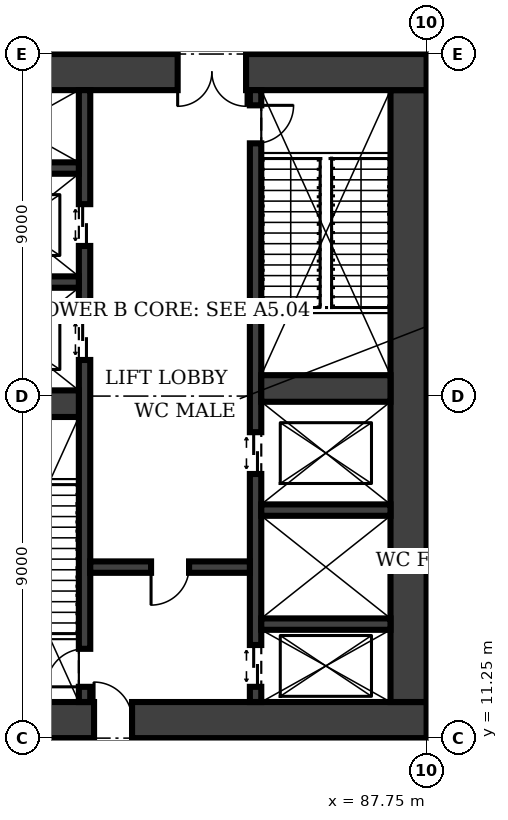
"""IFC4 building model, lengths in metres.
Left out: names, types, materials, properties, quantities, classifications, styles, units other than length and angle.
Written with IfcOpenShell. Run it as: python <this file> out.ifc"""

import sys

from ifc_helpers import new_model, si_unit, direction, frame, frame_2d, origin, place, context, subcontext, project, spatial, rectangle, extrude, element, fill, save


model = new_model("IFC4")
c1 = context("Model", 3, precision=1e-05, world=origin(), true_north=direction((0.0, 1.0)))
c2 = subcontext(c1, "Body", "Model", "MODEL_VIEW")
j1 = project(units=[si_unit("LENGTHUNIT", "METRE"), si_unit("PLANEANGLEUNIT", "RADIAN")], contexts=[c1])
p1 = place(None, origin())
s1 = spatial("IfcSite", under=j1, at=p1, CompositionType="ELEMENT")
p2 = place(p1, origin())
s2 = spatial("IfcBuilding", under=s1, at=p2, CompositionType="ELEMENT")
p3 = place(p2, frame((0.0, 0.0, 6.0)))
s3 = spatial("IfcBuildingStorey", under=s2, at=p3, CompositionType="ELEMENT", Elevation=6.0)
p4 = place(p3, frame((74.25, 11.725, 0.0), z_axis=(0.0, 0.0, 1.0), x_axis=(1.0, 0.0, 0.0)))
e1 = element("IfcWall", 1, at=p4, inside=s3, PredefinedType="SHEAR", context=c2, shape_type="SweptSolid", body=[
    extrude(rectangle(XDim=13.5, YDim=0.95, at=frame_2d((6.75, 0.0))), origin(), (0.0, 0.0, 1.0), 5.0),
])
p5 = place(p4, frame((4.75, 0.0, 0.0)))
e2 = element("IfcOpeningElement", 2, at=p5, cuts=e1, PredefinedType="OPENING", context=c2, shape_type="SweptSolid", body=[
    extrude(rectangle(XDim=1.0, YDim=2.1, at=frame_2d((0.5, 1.05))), frame((0.0, 0.485, 0.0), z_axis=(0.0, -1.0, 0.0), x_axis=(1.0, 0.0, 0.0)), (0.0, 0.0, 1.0), 0.97),
])
p6 = place(p3, frame((87.275, 12.2, 0.0), z_axis=(0.0, 0.0, 1.0), x_axis=(0.0, 1.0, 0.0)))
e3 = element("IfcWall", 3, at=p6, inside=s3, PredefinedType="SHEAR", context=c2, shape_type="SweptSolid", body=[
    extrude(rectangle(XDim=16.1, YDim=0.95, at=frame_2d((8.05, 0.0))), origin(), (0.0, 0.0, 1.0), 5.0),
])
p7 = place(p3, frame((87.75, 28.775, 0.0), z_axis=(0.0, 0.0, 1.0), x_axis=(-1.0, 0.0, 0.0)))
e4 = element("IfcWall", 4, at=p7, inside=s3, PredefinedType="SHEAR", context=c2, shape_type="SweptSolid", body=[
    extrude(rectangle(XDim=13.5, YDim=0.95, at=frame_2d((6.75, 0.0))), origin(), (0.0, 0.0, 1.0), 5.0),
])
p8 = place(p7, frame((4.75, 0.0, 0.0)))
e5 = element("IfcOpeningElement", 5, at=p8, cuts=e4, PredefinedType="OPENING", context=c2, shape_type="SweptSolid", body=[
    extrude(rectangle(XDim=1.8, YDim=2.1, at=frame_2d((0.9, 1.05))), frame((0.0, 0.485, 0.0), z_axis=(0.0, -1.0, 0.0), x_axis=(1.0, 0.0, 0.0)), (0.0, 0.0, 1.0), 0.97),
])
p9 = place(p3, frame((78.75, 12.2, 0.0), z_axis=(0.0, 0.0, 1.0), x_axis=(0.0, 1.0, 0.0)))
e6 = element("IfcWall", 6, at=p9, inside=s3, PredefinedType="SHEAR", context=c2, shape_type="SweptSolid", body=[
    extrude(rectangle(XDim=16.1, YDim=0.3, at=frame_2d((8.05, 0.0))), origin(), (0.0, 0.0, 1.0), 5.0),
])
p10 = place(p9, frame((0.4, 0.0, 0.0)))
e7 = element("IfcOpeningElement", 7, at=p10, cuts=e6, PredefinedType="OPENING", context=c2, shape_type="SweptSolid", body=[
    extrude(rectangle(XDim=1.0, YDim=2.1, at=frame_2d((0.5, 1.05))), frame((0.0, 0.16, 0.0), z_axis=(0.0, -1.0, 0.0), x_axis=(1.0, 0.0, 0.0)), (0.0, 0.0, 1.0), 0.32),
])
p11 = place(p9, frame((9.0, 0.0, 0.0)))
e8 = element("IfcOpeningElement", 8, at=p11, cuts=e6, PredefinedType="OPENING", context=c2, shape_type="SweptSolid", body=[
    extrude(rectangle(XDim=1.1, YDim=2.1, at=frame_2d((0.55, 1.05))), frame((0.0, 0.16, 0.0), z_axis=(0.0, -1.0, 0.0), x_axis=(1.0, 0.0, 0.0)), (0.0, 0.0, 1.0), 0.32),
])
p12 = place(p9, frame((12.0, 0.0, 0.0)))
e9 = element("IfcOpeningElement", 9, at=p12, cuts=e6, PredefinedType="OPENING", context=c2, shape_type="SweptSolid", body=[
    extrude(rectangle(XDim=1.1, YDim=2.1, at=frame_2d((0.55, 1.05))), frame((0.0, 0.16, 0.0), z_axis=(0.0, -1.0, 0.0), x_axis=(1.0, 0.0, 0.0)), (0.0, 0.0, 1.0), 0.32),
])
p13 = place(p3, frame((83.25, 12.2, 0.0), z_axis=(0.0, 0.0, 1.0), x_axis=(0.0, 1.0, 0.0)))
e10 = element("IfcWall", 10, at=p13, inside=s3, PredefinedType="SHEAR", context=c2, shape_type="SweptSolid", body=[
    extrude(rectangle(XDim=16.1, YDim=0.3, at=frame_2d((8.05, 0.0))), origin(), (0.0, 0.0, 1.0), 5.0),
])
p14 = place(p13, frame((14.7, 0.0, 0.0)))
e11 = element("IfcOpeningElement", 11, at=p14, cuts=e10, PredefinedType="OPENING", context=c2, shape_type="SweptSolid", body=[
    extrude(rectangle(XDim=1.0, YDim=2.1, at=frame_2d((0.5, 1.05))), frame((0.0, 0.16, 0.0), z_axis=(0.0, -1.0, 0.0), x_axis=(1.0, 0.0, 0.0)), (0.0, 0.0, 1.0), 0.32),
])
p15 = place(p13, frame((0.4, 0.0, 0.0)))
e12 = element("IfcOpeningElement", 12, at=p15, cuts=e10, PredefinedType="OPENING", context=c2, shape_type="SweptSolid", body=[
    extrude(rectangle(XDim=1.1, YDim=2.1, at=frame_2d((0.55, 1.05))), frame((0.0, 0.16, 0.0), z_axis=(0.0, -1.0, 0.0), x_axis=(1.0, 0.0, 0.0)), (0.0, 0.0, 1.0), 0.32),
])
p16 = place(p13, frame((6.0, 0.0, 0.0)))
e13 = element("IfcOpeningElement", 13, at=p16, cuts=e10, PredefinedType="OPENING", context=c2, shape_type="SweptSolid", body=[
    extrude(rectangle(XDim=1.1, YDim=2.1, at=frame_2d((0.55, 1.05))), frame((0.0, 0.16, 0.0), z_axis=(0.0, -1.0, 0.0), x_axis=(1.0, 0.0, 0.0)), (0.0, 0.0, 1.0), 0.32),
])
p17 = place(p3, frame((75.2, 20.05, 0.0), z_axis=(0.0, 0.0, 1.0), x_axis=(1.0, 0.0, 0.0)))
e14 = element("IfcWall", 14, at=p17, inside=s3, PredefinedType="SHEAR", context=c2, shape_type="SweptSolid", body=[
    extrude(rectangle(XDim=3.4, YDim=0.7, at=frame_2d((1.7, 0.0))), origin(), (0.0, 0.0, 1.0), 5.0),
])
p18 = place(p3, frame((78.9, 15.75, 0.0), z_axis=(0.0, 0.0, 1.0), x_axis=(1.0, 0.0, 0.0)))
e15 = element("IfcWall", 15, at=p18, inside=s3, PredefinedType="SHEAR", context=c2, shape_type="SweptSolid", body=[
    extrude(rectangle(XDim=4.2, YDim=0.3, at=frame_2d((2.1, 0.0))), origin(), (0.0, 0.0, 1.0), 5.0),
])
p19 = place(p18, frame((1.6, 0.0, 0.0)))
e16 = element("IfcOpeningElement", 16, at=p19, cuts=e15, PredefinedType="OPENING", context=c2, shape_type="SweptSolid", body=[
    extrude(rectangle(XDim=1.0, YDim=2.1, at=frame_2d((0.5, 1.05))), frame((0.0, 0.16, 0.0), z_axis=(0.0, -1.0, 0.0), x_axis=(1.0, 0.0, 0.0)), (0.0, 0.0, 1.0), 0.32),
])
for number, where, z_axis, x_axis in (
    (17, (83.4, 14.25, 0.0), (0.0, 0.0, 1.0), (1.0, 0.0, 0.0)),
    (18, (83.4, 17.25, 0.0), (0.0, 0.0, 1.0), (1.0, 0.0, 0.0)),
):
    element("IfcWall", number, at=place(p3, frame(where, z_axis=z_axis, x_axis=x_axis)), inside=s3, PredefinedType="SHEAR", context=c2, shape_type="SweptSolid", body=[
        extrude(rectangle(XDim=3.4, YDim=0.3, at=frame_2d((1.7, 0.0))), origin(), (0.0, 0.0, 1.0), 5.0),
    ])
p20 = place(p3, frame((83.4, 20.45, 0.0), z_axis=(0.0, 0.0, 1.0), x_axis=(1.0, 0.0, 0.0)))
e19 = element("IfcWall", 19, at=p20, inside=s3, PredefinedType="SHEAR", context=c2, shape_type="SweptSolid", body=[
    extrude(rectangle(XDim=3.4, YDim=0.7, at=frame_2d((1.7, 0.0))), origin(), (0.0, 0.0, 1.0), 5.0),
])
for number, where, z_axis, x_axis in (
    (20, (75.2, 23.25, 0.0), (0.0, 0.0, 1.0), (1.0, 0.0, 0.0)),
    (21, (75.2, 26.25, 0.0), (0.0, 0.0, 1.0), (1.0, 0.0, 0.0)),
):
    element("IfcWall", number, at=place(p3, frame(where, z_axis=z_axis, x_axis=x_axis)), inside=s3, PredefinedType="SHEAR", context=c2, shape_type="SweptSolid", body=[
        extrude(rectangle(XDim=3.4, YDim=0.3, at=frame_2d((1.7, 0.0))), origin(), (0.0, 0.0, 1.0), 5.0),
    ])
p21 = place(p5, origin())
e22 = element("IfcDoor", 22, at=p21, inside=s3, OperationType="SINGLE_SWING_LEFT", PredefinedType="DOOR", context=c2, shape_type="SweptSolid", body=[
    extrude(rectangle(XDim=1.0, YDim=2.1, at=frame_2d((0.5, 1.05))), frame((0.0, 0.025, 0.0), z_axis=(0.0, -1.0, 0.0), x_axis=(1.0, 0.0, 0.0)), (0.0, 0.0, 1.0), 0.05),
])
fill(e2, e22)
p22 = place(p8, origin())
e23 = element("IfcDoor", 23, at=p22, inside=s3, OperationType="DOUBLE_DOOR_SINGLE_SWING", PredefinedType="DOOR", context=c2, shape_type="SweptSolid", body=[
    extrude(rectangle(XDim=1.8, YDim=2.1, at=frame_2d((0.9, 1.05))), frame((0.0, 0.025, 0.0), z_axis=(0.0, -1.0, 0.0), x_axis=(1.0, 0.0, 0.0)), (0.0, 0.0, 1.0), 0.05),
])
fill(e5, e23)
p23 = place(p19, frame((1.0, 0.0, 0.0), z_axis=(0.0, 0.0, 1.0), x_axis=(-1.0, 0.0, 0.0)))
e24 = element("IfcDoor", 24, at=p23, inside=s3, OperationType="SINGLE_SWING_RIGHT", PredefinedType="DOOR", context=c2, shape_type="SweptSolid", body=[
    extrude(rectangle(XDim=1.0, YDim=2.1, at=frame_2d((0.5, 1.05))), frame((0.0, 0.025, 0.0), z_axis=(0.0, -1.0, 0.0), x_axis=(1.0, 0.0, 0.0)), (0.0, 0.0, 1.0), 0.05),
])
fill(e16, e24)
p24 = place(p10, origin())
e25 = element("IfcDoor", 25, at=p24, inside=s3, OperationType="SINGLE_SWING_LEFT", PredefinedType="DOOR", context=c2, shape_type="SweptSolid", body=[
    extrude(rectangle(XDim=1.0, YDim=2.1, at=frame_2d((0.5, 1.05))), frame((0.0, 0.025, 0.0), z_axis=(0.0, -1.0, 0.0), x_axis=(1.0, 0.0, 0.0)), (0.0, 0.0, 1.0), 0.05),
])
fill(e7, e25)
p25 = place(p14, frame((1.0, 0.0, 0.0), z_axis=(0.0, 0.0, 1.0), x_axis=(-1.0, 0.0, 0.0)))
e26 = element("IfcDoor", 26, at=p25, inside=s3, OperationType="SINGLE_SWING_LEFT", PredefinedType="DOOR", context=c2, shape_type="SweptSolid", body=[
    extrude(rectangle(XDim=1.0, YDim=2.1, at=frame_2d((0.5, 1.05))), frame((0.0, 0.025, 0.0), z_axis=(0.0, -1.0, 0.0), x_axis=(1.0, 0.0, 0.0)), (0.0, 0.0, 1.0), 0.05),
])
fill(e11, e26)
p26 = place(p15, origin())
e27 = element("IfcDoor", 27, at=p26, inside=s3, OperationType="DOUBLE_DOOR_SLIDING", PredefinedType="DOOR", context=c2, shape_type="SweptSolid", body=[
    extrude(rectangle(XDim=1.1, YDim=2.1, at=frame_2d((0.55, 1.05))), frame((0.0, 0.025, 0.0), z_axis=(0.0, -1.0, 0.0), x_axis=(1.0, 0.0, 0.0)), (0.0, 0.0, 1.0), 0.05),
])
fill(e12, e27)
p27 = place(p11, origin())
e28 = element("IfcDoor", 28, at=p27, inside=s3, OperationType="DOUBLE_DOOR_SLIDING", PredefinedType="DOOR", context=c2, shape_type="SweptSolid", body=[
    extrude(rectangle(XDim=1.1, YDim=2.1, at=frame_2d((0.55, 1.05))), frame((0.0, 0.025, 0.0), z_axis=(0.0, -1.0, 0.0), x_axis=(1.0, 0.0, 0.0)), (0.0, 0.0, 1.0), 0.05),
])
fill(e8, e28)
p28 = place(p12, origin())
e29 = element("IfcDoor", 29, at=p28, inside=s3, OperationType="DOUBLE_DOOR_SLIDING", PredefinedType="DOOR", context=c2, shape_type="SweptSolid", body=[
    extrude(rectangle(XDim=1.1, YDim=2.1, at=frame_2d((0.55, 1.05))), frame((0.0, 0.025, 0.0), z_axis=(0.0, -1.0, 0.0), x_axis=(1.0, 0.0, 0.0)), (0.0, 0.0, 1.0), 0.05),
])
fill(e9, e29)
p29 = place(p16, origin())
e30 = element("IfcDoor", 30, at=p29, inside=s3, OperationType="DOUBLE_DOOR_SLIDING", PredefinedType="DOOR", context=c2, shape_type="SweptSolid", body=[
    extrude(rectangle(XDim=1.1, YDim=2.1, at=frame_2d((0.55, 1.05))), frame((0.0, 0.025, 0.0), z_axis=(0.0, -1.0, 0.0), x_axis=(1.0, 0.0, 0.0)), (0.0, 0.0, 1.0), 0.05),
])
fill(e13, e30)
save(model, sys.argv[1])
